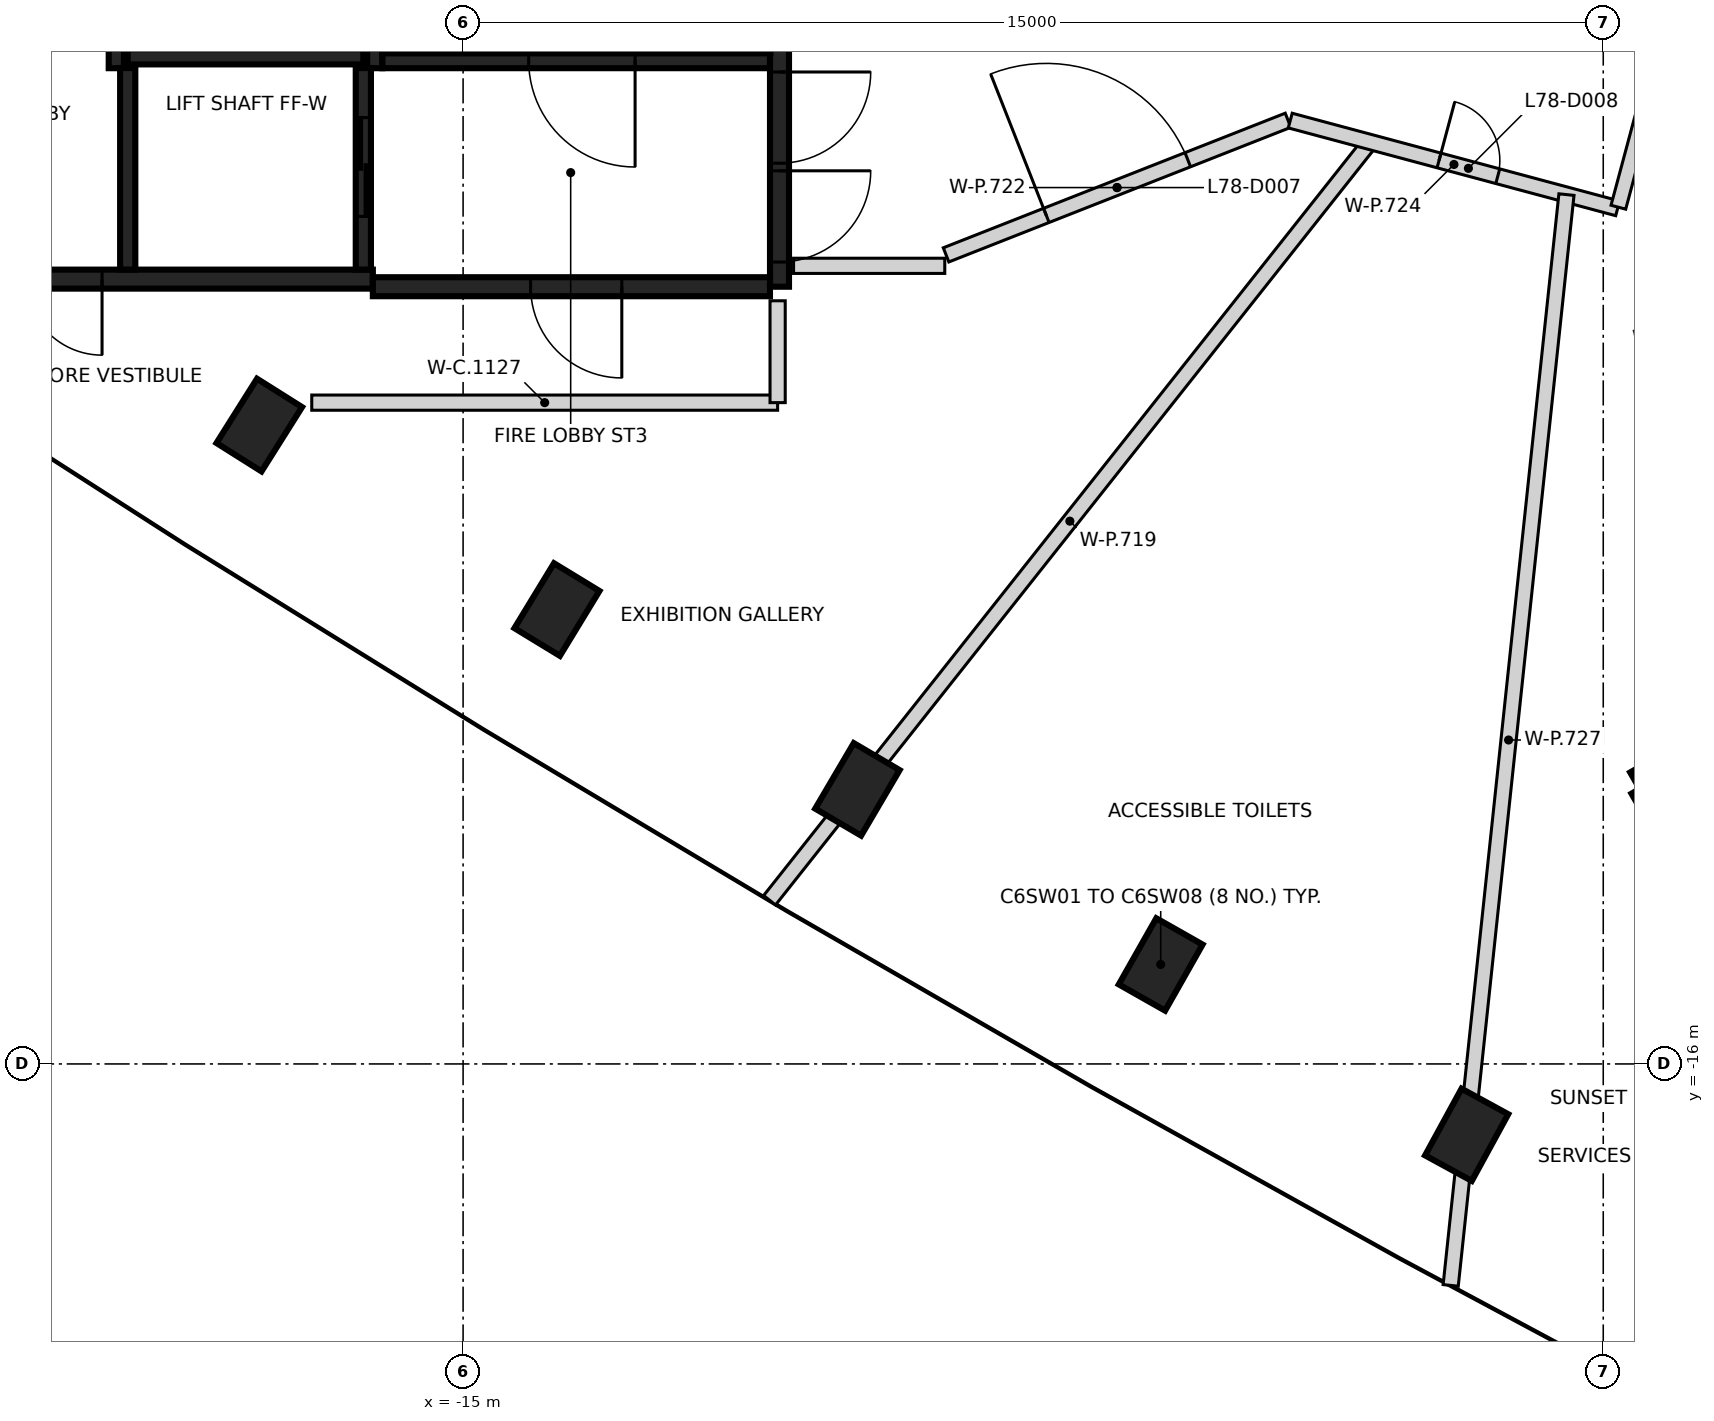
"""IFC4 building model, lengths in metres.
Left out: names, types, materials, properties, quantities, classifications, styles, units other than length and angle.
Written with IfcOpenShell. Run it as: python <this file> out.ifc"""

import sys

from ifc_helpers import new_model, si_unit, direction, frame, frame_2d, origin, origin_2d, place, context, subcontext, project, spatial, rectangle, extrude, element, fill, save


model = new_model("IFC4")
c1 = context("Model", 3, precision=1e-05, world=origin(), true_north=direction((0.0, 1.0)))
c2 = subcontext(c1, "Body", "Model", "MODEL_VIEW")
j1 = project(units=[si_unit("LENGTHUNIT", "METRE"), si_unit("PLANEANGLEUNIT", "RADIAN")], contexts=[c1])
p1 = place(None, origin())
s1 = spatial("IfcSite", under=j1, at=p1, CompositionType="ELEMENT")
p2 = place(p1, origin())
s2 = spatial("IfcBuilding", under=s1, at=p2, CompositionType="ELEMENT")
p3 = place(p2, frame((0.0, 0.0, 312.6)))
s3 = spatial("IfcBuildingStorey", under=s2, at=p3, CompositionType="ELEMENT", Elevation=312.6)
for number, where, z_axis, x_axis in (
    (1, (-17.681, -7.595, -0.35), (0.0, 0.0, 1.0), (0.533, 0.846, 0.0)),
    (2, (-13.765, -10.022, -0.35), (0.0, 0.0, 1.0), (0.52, 0.854, 0.0)),
    (3, (-9.812, -12.388, -0.35), (0.0, 0.0, 1.0), (0.507, 0.862, 0.0)),
    (4, (-5.822, -14.691, -0.35), (0.0, 0.0, 1.0), (0.493, 0.87, 0.0)),
    (5, (-1.797, -16.932, -0.35), (0.0, 0.0, 1.0), (0.479, 0.878, 0.0)),
):
    element("IfcColumn", number, at=place(p3, frame(where, z_axis=z_axis, x_axis=x_axis)), inside=s3, PredefinedType="COLUMN", context=c2, shape_type="SweptSolid", body=[
        extrude(rectangle(XDim=1.0, YDim=0.7, at=origin_2d()), origin(), (0.0, 0.0, 1.0), 8.1),
    ])
p4 = place(p3, frame((-10.837, 5.775, 0.0), z_axis=(0.0, 0.0, 1.0), x_axis=(0.0, -1.0, 0.0)))
e6 = element("IfcWall", 6, at=p4, inside=s3, PredefinedType="SHEAR", context=c2, shape_type="SweptSolid", body=[
    extrude(rectangle(XDim=11.55, YDim=0.25, at=frame_2d((5.775, 0.0))), origin(), (0.0, 0.0, 1.0), 7.75),
])
p5 = place(p4, frame((10.025, 0.0, 0.0)))
e7 = element("IfcOpeningElement", 7, at=p5, cuts=e6, PredefinedType="OPENING", context=c2, shape_type="SweptSolid", body=[
    extrude(rectangle(XDim=1.2, YDim=2.1, at=frame_2d((0.6, 1.05))), frame((0.0, 0.135, 0.0), z_axis=(0.0, -1.0, 0.0), x_axis=(1.0, 0.0, 0.0)), (0.0, 0.0, 1.0), 0.27),
])
p6 = place(p4, frame((8.725, 0.0, 0.0)))
e8 = element("IfcOpeningElement", 8, at=p6, cuts=e6, PredefinedType="OPENING", context=c2, shape_type="SweptSolid", body=[
    extrude(rectangle(XDim=1.2, YDim=2.1, at=frame_2d((0.6, 1.05))), frame((0.0, 0.135, 0.0), z_axis=(0.0, -1.0, 0.0), x_axis=(1.0, 0.0, 0.0)), (0.0, 0.0, 1.0), 0.27),
])
p7 = place(p3, frame((-16.187, -5.675, 0.0), z_axis=(0.0, 0.0, 1.0), x_axis=(-1.0, 0.0, 0.0)))
e9 = element("IfcWall", 9, at=p7, inside=s3, PredefinedType="SHEAR", context=c2, shape_type="SweptSolid", body=[
    extrude(rectangle(XDim=6.125, YDim=0.25, at=frame_2d((3.062, 0.0))), origin(), (0.0, 0.0, 1.0), 7.75),
])
p8 = place(p7, frame((3.563, 0.0, 0.0)))
e10 = element("IfcOpeningElement", 10, at=p8, cuts=e9, PredefinedType="OPENING", context=c2, shape_type="SweptSolid", body=[
    extrude(rectangle(XDim=1.0, YDim=2.1, at=frame_2d((0.5, 1.05))), frame((0.0, 0.135, 0.0), z_axis=(0.0, -1.0, 0.0), x_axis=(1.0, 0.0, 0.0)), (0.0, 0.0, 1.0), 0.27),
])
p9 = place(p3, frame((-10.963, -5.775, 0.0), z_axis=(0.0, 0.0, 1.0), x_axis=(-1.0, 0.0, 0.0)))
e11 = element("IfcWall", 11, at=p9, inside=s3, PredefinedType="SHEAR", context=c2, shape_type="SweptSolid", body=[
    extrude(rectangle(XDim=5.225, YDim=0.25, at=frame_2d((2.612, 0.0))), origin(), (0.0, 0.0, 1.0), 7.75),
])
p10 = place(p9, frame((1.949, 0.0, 0.0)))
e12 = element("IfcOpeningElement", 12, at=p10, cuts=e11, PredefinedType="OPENING", context=c2, shape_type="SweptSolid", body=[
    extrude(rectangle(XDim=1.2, YDim=2.1, at=frame_2d((0.6, 1.05))), frame((0.0, 0.135, 0.0), z_axis=(0.0, -1.0, 0.0), x_axis=(1.0, 0.0, 0.0)), (0.0, 0.0, 1.0), 0.27),
])
p11 = place(p3, frame((-16.162, 3.074, 0.0), z_axis=(0.0, 0.0, 1.0), x_axis=(0.0, -1.0, 0.0)))
e13 = element("IfcWall", 13, at=p11, inside=s3, PredefinedType="SHEAR", context=c2, shape_type="SweptSolid", body=[
    extrude(rectangle(XDim=5.974, YDim=0.2, at=frame_2d((2.987, 0.0))), origin(), (0.0, 0.0, 1.0), 7.75),
])
p12 = place(p3, frame((-19.562, -2.9, 0.0), z_axis=(0.0, 0.0, 1.0), x_axis=(0.0, 1.0, 0.0)))
e14 = element("IfcWall", 14, at=p12, inside=s3, PredefinedType="SHEAR", context=c2, shape_type="SweptSolid", body=[
    extrude(rectangle(XDim=6.1, YDim=0.2, at=frame_2d((3.05, 0.0))), origin(), (0.0, 0.0, 1.0), 7.75),
])
p13 = place(p12, frame((3.95, 0.0, 0.0)))
e15 = element("IfcOpeningElement", 15, at=p13, cuts=e14, PredefinedType="OPENING", context=c2, shape_type="SweptSolid", body=[
    extrude(rectangle(XDim=1.1, YDim=2.1, at=frame_2d((0.55, 1.05))), frame((0.0, 0.11, 0.0), z_axis=(0.0, -1.0, 0.0), x_axis=(1.0, 0.0, 0.0)), (0.0, 0.0, 1.0), 0.22),
])
p14 = place(p12, frame((0.968, 0.0, 0.0)))
e16 = element("IfcOpeningElement", 16, at=p14, cuts=e14, PredefinedType="OPENING", context=c2, shape_type="SweptSolid", body=[
    extrude(rectangle(XDim=1.1, YDim=2.1, at=frame_2d((0.55, 1.05))), frame((0.0, 0.11, 0.0), z_axis=(0.0, -1.0, 0.0), x_axis=(1.0, 0.0, 0.0)), (0.0, 0.0, 1.0), 0.22),
])
p15 = place(p3, frame((-10.963, -2.8, 0.0), z_axis=(0.0, 0.0, 1.0), x_axis=(-1.0, 0.0, 0.0)))
e17 = element("IfcWall", 17, at=p15, inside=s3, PredefinedType="SHEAR", context=c2, shape_type="SweptSolid", body=[
    extrude(rectangle(XDim=5.098, YDim=0.2, at=frame_2d((2.549, 0.0))), origin(), (0.0, 0.0, 1.0), 7.75),
])
p16 = place(p15, frame((1.774, 0.0, 0.0)))
e18 = element("IfcOpeningElement", 18, at=p16, cuts=e17, PredefinedType="OPENING", context=c2, shape_type="SweptSolid", body=[
    extrude(rectangle(XDim=1.4, YDim=2.1, at=frame_2d((0.7, 1.05))), frame((0.0, 0.11, 0.0), z_axis=(0.0, -1.0, 0.0), x_axis=(1.0, 0.0, 0.0)), (0.0, 0.0, 1.0), 0.22),
])
p17 = place(p3, frame((-19.412, -2.75, 0.0), z_axis=(0.0, 0.0, 1.0), x_axis=(1.0, 0.0, 0.0)))
e19 = element("IfcWall", 19, at=p17, inside=s3, PredefinedType="SHEAR", context=c2, shape_type="SweptSolid", body=[
    extrude(rectangle(XDim=3.1, YDim=0.2, at=frame_2d((1.55, 0.0))), origin(), (0.0, 0.0, 1.0), 7.75),
])
p18 = place(p3, frame((-16.312, -2.898, 0.0), z_axis=(0.0, 0.0, 1.0), x_axis=(0.0, -1.0, 0.0)))
e20 = element("IfcWall", 20, at=p18, inside=s3, PredefinedType="SHEAR", context=c2, shape_type="SweptSolid", body=[
    extrude(rectangle(XDim=2.651, YDim=0.2, at=frame_2d((1.325, 0.0))), origin(), (0.0, 0.0, 1.0), 7.75),
])
p19 = place(p18, frame((0.652, 0.0, 0.0)))
e21 = element("IfcOpeningElement", 21, at=p19, cuts=e20, PredefinedType="OPENING", context=c2, shape_type="SweptSolid", body=[
    extrude(rectangle(XDim=1.3, YDim=2.1, at=frame_2d((0.65, 1.05))), frame((0.0, 0.11, 0.0), z_axis=(0.0, -1.0, 0.0), x_axis=(1.0, 0.0, 0.0)), (0.0, 0.0, 1.0), 0.22),
])
p20 = place(p3, frame((-19.412, -5.549, 0.0), z_axis=(0.0, 0.0, 1.0), x_axis=(0.0, 1.0, 0.0)))
e22 = element("IfcWall", 22, at=p20, inside=s3, PredefinedType="SHEAR", context=c2, shape_type="SweptSolid", body=[
    extrude(rectangle(XDim=2.651, YDim=0.2, at=frame_2d((1.325, 0.0))), origin(), (0.0, 0.0, 1.0), 7.75),
])
p21 = place(p3, frame((0.417, -12.273, 0.0), z_axis=(0.0, 0.0, 1.0), x_axis=(0.866021906294, 0.500006057782, 0.0)))
e23 = element("IfcWall", 23, at=p21, inside=s3, PredefinedType="SHEAR", context=c2, shape_type="SweptSolid", body=[
    extrude(rectangle(XDim=11.55, YDim=0.25, at=frame_2d((5.775, 0.0))), origin(), (0.0, 0.0, 1.0), 7.75),
])
p22 = place(p21, frame((10.025, 0.0, 0.0)))
e24 = element("IfcOpeningElement", 24, at=p22, cuts=e23, PredefinedType="OPENING", context=c2, shape_type="SweptSolid", body=[
    extrude(rectangle(XDim=1.2, YDim=2.1, at=frame_2d((0.6, 1.05))), frame((0.0, 0.135, 0.0), z_axis=(0.0, -1.0, 0.0), x_axis=(1.0, 0.0, 0.0)), (0.0, 0.0, 1.0), 0.27),
])
p23 = place(p21, frame((8.725, 0.0, 0.0)))
e25 = element("IfcOpeningElement", 25, at=p23, cuts=e23, PredefinedType="OPENING", context=c2, shape_type="SweptSolid", body=[
    extrude(rectangle(XDim=1.2, YDim=2.1, at=frame_2d((0.6, 1.05))), frame((0.0, 0.135, 0.0), z_axis=(0.0, -1.0, 0.0), x_axis=(1.0, 0.0, 0.0)), (0.0, 0.0, 1.0), 0.27),
])
p24 = place(p3, frame((3.235, -17.153, 0.0), z_axis=(0.0, 0.0, 1.0), x_axis=(-0.500008851346, 0.866020293397, 0.0)))
e26 = element("IfcWall", 26, at=p24, inside=s3, PredefinedType="SHEAR", context=c2, shape_type="SweptSolid", body=[
    extrude(rectangle(XDim=5.51, YDim=0.25, at=frame_2d((2.755, 0.0))), origin(), (0.0, 0.0, 1.0), 7.75),
])
p25 = place(p3, frame((-16.991, -7.3, 0.0), z_axis=(0.0, 0.0, 1.0), x_axis=(1.0, 0.0, 0.0)))
e27 = element("IfcWall", 27, at=p25, inside=s3, PredefinedType="PARTITIONING", context=c2, shape_type="SweptSolid", body=[
    extrude(rectangle(XDim=6.129, YDim=0.2, at=frame_2d((3.064, 0.0))), origin(), (0.0, 0.0, 1.0), 7.75),
])
p26 = place(p3, frame((-10.862, -7.3, 0.0), z_axis=(0.0, 0.0, 1.0), x_axis=(0.0, 1.0, 0.0)))
e28 = element("IfcWall", 28, at=p26, inside=s3, PredefinedType="PARTITIONING", context=c2, shape_type="SweptSolid", body=[
    extrude(rectangle(XDim=1.34, YDim=0.2, at=frame_2d((0.67, 0.0))), origin(), (0.0, 0.0, 1.0), 7.75),
])
p27 = place(p3, frame((-10.968, -13.846, 0.0), z_axis=(0.0, 0.0, 1.0), x_axis=(0.620920629301, 0.783873441385, 0.0)))
e29 = element("IfcWall", 29, at=p27, inside=s3, PredefinedType="PARTITIONING", context=c2, shape_type="SweptSolid", body=[
    extrude(rectangle(XDim=12.724, YDim=0.2, at=frame_2d((6.362, 0.0))), origin(), (0.0, 0.0, 1.0), 7.75),
])
p28 = place(p3, frame((-10.652, -5.5, 0.0), z_axis=(0.0, 0.0, 1.0), x_axis=(1.0, 0.0, 0.0)))
e30 = element("IfcWall", 30, at=p28, inside=s3, PredefinedType="PARTITIONING", context=c2, shape_type="SweptSolid", body=[
    extrude(rectangle(XDim=1.989, YDim=0.2, at=frame_2d((0.995, 0.0))), origin(), (0.0, 0.0, 1.0), 7.75),
])
p29 = place(p3, frame((-8.646, -5.356, 0.0), z_axis=(0.0, 0.0, 1.0), x_axis=(0.930503328828, 0.366283435388, 0.0)))
e31 = element("IfcWall", 31, at=p29, inside=s3, PredefinedType="PARTITIONING", context=c2, shape_type="SweptSolid", body=[
    extrude(rectangle(XDim=4.835, YDim=0.2, at=frame_2d((2.417, 0.0))), origin(), (0.0, 0.0, 1.0), 7.75),
])
p30 = place(p29, frame((1.417, 0.0, 0.0)))
e32 = element("IfcOpeningElement", 32, at=p30, cuts=e31, PredefinedType="OPENING", context=c2, shape_type="SweptSolid", body=[
    extrude(rectangle(XDim=2.0, YDim=2.1, at=frame_2d((1.0, 1.05))), frame((0.0, 0.11, 0.0), z_axis=(0.0, -1.0, 0.0), x_axis=(1.0, 0.0, 0.0)), (0.0, 0.0, 1.0), 0.22),
])
p31 = place(p3, frame((-4.118, -3.589, 0.0), z_axis=(0.0, 0.0, 1.0), x_axis=(0.965894280721, -0.258936746079, 0.0)))
e33 = element("IfcWall", 33, at=p31, inside=s3, PredefinedType="PARTITIONING", context=c2, shape_type="SweptSolid", body=[
    extrude(rectangle(XDim=4.46, YDim=0.2, at=frame_2d((2.23, 0.0))), origin(), (0.0, 0.0, 1.0), 7.75),
])
p32 = place(p31, frame((2.027, 0.0, 0.0)))
e34 = element("IfcOpeningElement", 34, at=p32, cuts=e33, PredefinedType="OPENING", context=c2, shape_type="SweptSolid", body=[
    extrude(rectangle(XDim=0.8, YDim=2.1, at=frame_2d((0.4, 1.05))), frame((0.0, 0.11, 0.0), z_axis=(0.0, -1.0, 0.0), x_axis=(1.0, 0.0, 0.0)), (0.0, 0.0, 1.0), 0.22),
])
p33 = place(p3, frame((-2.007, -18.914, 0.0), z_axis=(0.0, 0.0, 1.0), x_axis=(0.105531923802, 0.99441591553, 0.0)))
e35 = element("IfcWall", 35, at=p33, inside=s3, PredefinedType="PARTITIONING", context=c2, shape_type="SweptSolid", body=[
    extrude(rectangle(XDim=14.431, YDim=0.2, at=frame_2d((7.216, 0.0))), origin(), (0.0, 0.0, 1.0), 7.75),
])
p34 = place(p3, frame((0.199, -4.729, 0.0), z_axis=(0.0, 0.0, 1.0), x_axis=(0.259191159513, 0.965826041702, 0.0)))
e36 = element("IfcWall", 36, at=p34, inside=s3, PredefinedType="PARTITIONING", context=c2, shape_type="SweptSolid", body=[
    extrude(rectangle(XDim=1.242, YDim=0.2, at=frame_2d((0.621, 0.0))), origin(), (0.0, 0.0, 1.0), 7.75),
])
p35 = place(p19, origin())
e37 = element("IfcDoor", 37, at=p35, inside=s3, OperationType="SLIDING_TO_RIGHT", PredefinedType="DOOR", context=c2, shape_type="SweptSolid", body=[
    extrude(rectangle(XDim=1.3, YDim=2.1, at=frame_2d((0.65, 1.05))), frame((0.0, 0.025, 0.0), z_axis=(0.0, -1.0, 0.0), x_axis=(1.0, 0.0, 0.0)), (0.0, 0.0, 1.0), 0.05),
])
fill(e21, e37)
p36 = place(p8, origin())
e38 = element("IfcDoor", 38, at=p36, inside=s3, OperationType="SINGLE_SWING_LEFT", PredefinedType="DOOR", context=c2, shape_type="SweptSolid", body=[
    extrude(rectangle(XDim=1.0, YDim=2.1, at=frame_2d((0.5, 1.05))), frame((0.0, 0.025, 0.0), z_axis=(0.0, -1.0, 0.0), x_axis=(1.0, 0.0, 0.0)), (0.0, 0.0, 1.0), 0.05),
])
fill(e10, e38)
p37 = place(p5, origin())
e39 = element("IfcDoor", 39, at=p37, inside=s3, OperationType="SINGLE_SWING_LEFT", PredefinedType="DOOR", context=c2, shape_type="SweptSolid", body=[
    extrude(rectangle(XDim=1.2, YDim=2.1, at=frame_2d((0.6, 1.05))), frame((0.0, 0.025, 0.0), z_axis=(0.0, -1.0, 0.0), x_axis=(1.0, 0.0, 0.0)), (0.0, 0.0, 1.0), 0.05),
])
fill(e7, e39)
p38 = place(p6, origin())
e40 = element("IfcDoor", 40, at=p38, inside=s3, OperationType="SINGLE_SWING_RIGHT", PredefinedType="DOOR", context=c2, shape_type="SweptSolid", body=[
    extrude(rectangle(XDim=1.2, YDim=2.1, at=frame_2d((0.6, 1.05))), frame((0.0, 0.025, 0.0), z_axis=(0.0, -1.0, 0.0), x_axis=(1.0, 0.0, 0.0)), (0.0, 0.0, 1.0), 0.05),
])
fill(e8, e40)
p39 = place(p10, origin())
e41 = element("IfcDoor", 41, at=p39, inside=s3, OperationType="SINGLE_SWING_LEFT", PredefinedType="DOOR", context=c2, shape_type="SweptSolid", body=[
    extrude(rectangle(XDim=1.2, YDim=2.1, at=frame_2d((0.6, 1.05))), frame((0.0, 0.025, 0.0), z_axis=(0.0, -1.0, 0.0), x_axis=(1.0, 0.0, 0.0)), (0.0, 0.0, 1.0), 0.05),
])
fill(e12, e41)
p40 = place(p16, origin())
e42 = element("IfcDoor", 42, at=p40, inside=s3, OperationType="SINGLE_SWING_LEFT", PredefinedType="DOOR", context=c2, shape_type="SweptSolid", body=[
    extrude(rectangle(XDim=1.4, YDim=2.1, at=frame_2d((0.7, 1.05))), frame((0.0, 0.025, 0.0), z_axis=(0.0, -1.0, 0.0), x_axis=(1.0, 0.0, 0.0)), (0.0, 0.0, 1.0), 0.05),
])
fill(e18, e42)
p41 = place(p30, frame((2.0, 0.0, 0.0), z_axis=(0.0, 0.0, 1.0), x_axis=(-1.0, 0.0, 0.0)))
e43 = element("IfcDoor", 43, at=p41, inside=s3, OperationType="DOUBLE_DOOR_SINGLE_SWING", PredefinedType="DOOR", context=c2, shape_type="SweptSolid", body=[
    extrude(rectangle(XDim=2.0, YDim=2.1, at=frame_2d((1.0, 1.05))), frame((0.0, 0.025, 0.0), z_axis=(0.0, -1.0, 0.0), x_axis=(1.0, 0.0, 0.0)), (0.0, 0.0, 1.0), 0.05),
])
fill(e32, e43)
p42 = place(p32, frame((0.8, 0.0, 0.0), z_axis=(0.0, 0.0, 1.0), x_axis=(-1.0, 0.0, 0.0)))
e44 = element("IfcDoor", 44, at=p42, inside=s3, OperationType="SINGLE_SWING_LEFT", PredefinedType="DOOR", context=c2, shape_type="SweptSolid", body=[
    extrude(rectangle(XDim=0.8, YDim=2.1, at=frame_2d((0.4, 1.05))), frame((0.0, 0.025, 0.0), z_axis=(0.0, -1.0, 0.0), x_axis=(1.0, 0.0, 0.0)), (0.0, 0.0, 1.0), 0.05),
])
fill(e34, e44)
save(model, sys.argv[1])
